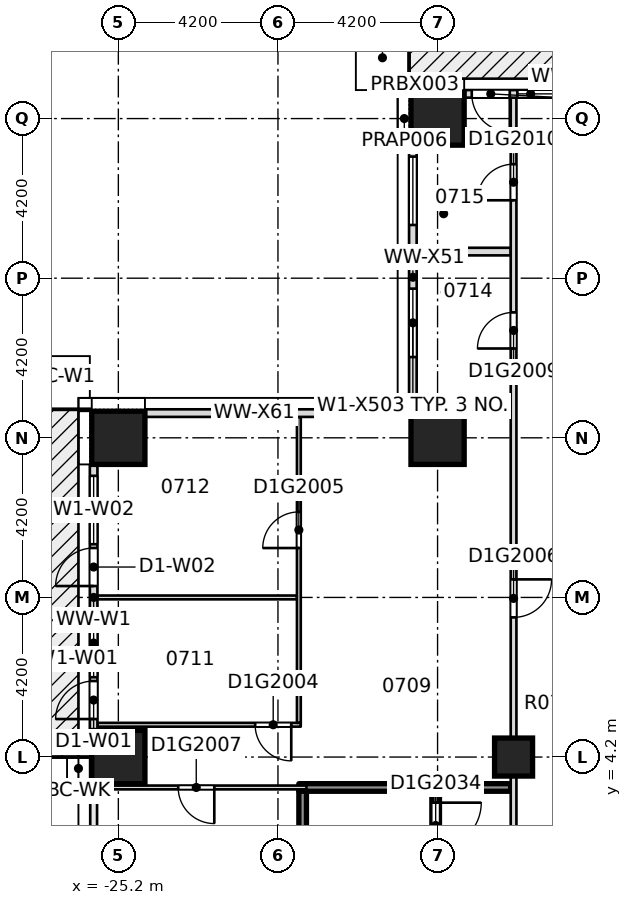
"""IFC4 building model, lengths in metres.
Left out: names, types, materials, properties, quantities, classifications, styles, units other than length and angle.
Written with IfcOpenShell. Run it as: python <this file> out.ifc"""

import sys

from ifc_helpers import new_model, si_unit, direction, frame, frame_2d, origin, origin_2d, place, context, subcontext, project, spatial, rectangle, extrude, element, fill, save


model = new_model("IFC4")
c1 = context("Model", 3, precision=1e-05, world=origin(), true_north=direction((0.0, 1.0)))
c2 = subcontext(c1, "Body", "Model", "MODEL_VIEW")
j1 = project(units=[si_unit("LENGTHUNIT", "METRE"), si_unit("PLANEANGLEUNIT", "RADIAN")], contexts=[c1])
p1 = place(None, origin())
s1 = spatial("IfcSite", under=j1, at=p1, CompositionType="ELEMENT")
p2 = place(p1, origin())
s2 = spatial("IfcBuilding", under=s1, at=p2, CompositionType="ELEMENT")
p3 = place(p2, frame((0.0, 0.0, 37.95)))
s3 = spatial("IfcBuildingStorey", under=s2, at=p3, CompositionType="ELEMENT", Elevation=37.95)
for number, where, z_axis, x_axis in (
    (1, (-25.2, 4.2, -0.32), (0.0, 0.0, 1.0), (1.0, 0.0, 0.0)),
    (2, (-25.2, 12.6, -0.32), (0.0, 0.0, 1.0), (1.0, 0.0, 0.0)),
    (3, (-16.8, 12.6, -0.32), (0.0, 0.0, 1.0), (1.0, 0.0, 0.0)),
    (4, (-16.8, 21.0, -0.32), (0.0, 0.0, 1.0), (1.0, 0.0, 0.0)),
):
    element("IfcColumn", number, at=place(p3, frame(where, z_axis=z_axis, x_axis=x_axis)), inside=s3, PredefinedType="COLUMN", context=c2, shape_type="SweptSolid", body=[
        extrude(rectangle(XDim=1.4, YDim=1.4, at=origin_2d()), origin(), (0.0, 0.0, 1.0), 3.45),
    ])
p4 = place(p3, frame((-14.8, 4.2, -0.32), z_axis=(0.0, 0.0, 1.0), x_axis=(1.0, 0.0, 0.0)))
e5 = element("IfcColumn", 5, at=p4, inside=s3, PredefinedType="COLUMN", context=c2, shape_type="SweptSolid", body=[
    extrude(rectangle(XDim=1.0, YDim=1.0, at=origin_2d()), origin(), (0.0, 0.0, 1.0), 3.45),
])
p5 = place(p3, frame((-25.75, 3.4, 0.0), z_axis=(0.0, 0.0, 1.0), x_axis=(1.0, 0.0, 0.0)))
e6 = element("IfcWall", 6, at=p5, inside=s3, PredefinedType="PARTITIONING", context=c2, shape_type="SweptSolid", body=[
    extrude(rectangle(XDim=5.5, YDim=0.1, at=frame_2d((2.75, 0.0))), origin(), (0.0, 0.0, 1.0), 3.13),
])
p6 = place(p5, frame((2.125, 0.0, 0.0)))
e7 = element("IfcOpeningElement", 7, at=p6, cuts=e6, PredefinedType="OPENING", context=c2, shape_type="SweptSolid", body=[
    extrude(rectangle(XDim=0.95, YDim=2.1, at=frame_2d((0.475, 1.05))), frame((0.0, 0.06, 0.0), z_axis=(0.0, -1.0, 0.0), x_axis=(1.0, 0.0, 0.0)), (0.0, 0.0, 1.0), 0.12),
])
p7 = place(p3, frame((-20.45, 3.4, 0.0), z_axis=(0.0, 0.0, 1.0), x_axis=(1.0, 0.0, 0.0)))
e8 = element("IfcWall", 8, at=p7, inside=s3, PredefinedType="SOLIDWALL", context=c2, shape_type="SweptSolid", body=[
    extrude(rectangle(XDim=5.575, YDim=0.2, at=frame_2d((2.788, 0.0))), origin(), (0.0, 0.0, 1.0), 3.13),
])
p8 = place(p3, frame((-25.75, 5.05, 0.0), z_axis=(0.0, 0.0, 1.0), x_axis=(1.0, 0.0, 0.0)))
e9 = element("IfcWall", 9, at=p8, inside=s3, PredefinedType="PARTITIONING", context=c2, shape_type="SweptSolid", body=[
    extrude(rectangle(XDim=5.35, YDim=0.1, at=frame_2d((2.675, 0.0))), origin(), (0.0, 0.0, 1.0), 3.13),
])
p9 = place(p8, frame((4.15, 0.0, 0.0)))
e10 = element("IfcOpeningElement", 10, at=p9, cuts=e9, PredefinedType="OPENING", context=c2, shape_type="SweptSolid", body=[
    extrude(rectangle(XDim=0.95, YDim=2.1, at=frame_2d((0.475, 1.05))), frame((0.0, 0.06, 0.0), z_axis=(0.0, -1.0, 0.0), x_axis=(1.0, 0.0, 0.0)), (0.0, 0.0, 1.0), 0.12),
])
p10 = place(p3, frame((-25.75, 8.4, 0.0), z_axis=(0.0, 0.0, 1.0), x_axis=(1.0, 0.0, 0.0)))
e11 = element("IfcWall", 11, at=p10, inside=s3, PredefinedType="PARTITIONING", context=c2, shape_type="SweptSolid", body=[
    extrude(rectangle(XDim=5.25, YDim=0.1, at=frame_2d((2.625, 0.0))), origin(), (0.0, 0.0, 1.0), 3.13),
])
for number, where, z_axis, x_axis in (
    (12, (-17.35, 13.35, 0.0), (0.0, 0.0, 1.0), (1.0, 0.0, 0.0)),
    (13, (-17.35, 17.5, 0.0), (0.0, 0.0, 1.0), (1.0, 0.0, 0.0)),
):
    element("IfcWall", number, at=place(p3, frame(where, z_axis=z_axis, x_axis=x_axis)), inside=s3, PredefinedType="PARTITIONING", context=c2, shape_type="SweptSolid", body=[
        extrude(rectangle(XDim=2.475, YDim=0.2, at=frame_2d((1.238, 0.0))), origin(), (0.0, 0.0, 1.0), 3.13),
    ])
p11 = place(p3, frame((-20.45, 5.1, 0.0), z_axis=(0.0, 0.0, 1.0), x_axis=(0.0, 1.0, 0.0)))
e14 = element("IfcWall", 14, at=p11, inside=s3, PredefinedType="PARTITIONING", context=c2, shape_type="SweptSolid", body=[
    extrude(rectangle(XDim=8.05, YDim=0.1, at=frame_2d((4.025, 0.0))), origin(), (0.0, 0.0, 1.0), 3.13),
])
p12 = place(p11, frame((4.6, 0.0, 0.0)))
e15 = element("IfcOpeningElement", 15, at=p12, cuts=e14, PredefinedType="OPENING", context=c2, shape_type="SweptSolid", body=[
    extrude(rectangle(XDim=0.95, YDim=2.1, at=frame_2d((0.475, 1.05))), frame((0.0, 0.06, 0.0), z_axis=(0.0, -1.0, 0.0), x_axis=(1.0, 0.0, 0.0)), (0.0, 0.0, 1.0), 0.12),
])
p13 = place(p3, frame((-16.85, -3.3, 0.0), z_axis=(0.0, 0.0, 1.0), x_axis=(0.0, 1.0, 0.0)))
e16 = element("IfcWall", 16, at=p13, inside=s3, PredefinedType="SOLIDWALL", context=c2, shape_type="SweptSolid", body=[
    extrude(rectangle(XDim=6.6, YDim=0.2, at=frame_2d((3.3, 0.0))), origin(), (0.0, 0.0, 1.0), 3.13),
])
p14 = place(p13, frame((5.1, 0.0, 0.0)))
e17 = element("IfcOpeningElement", 17, at=p14, cuts=e16, PredefinedType="OPENING", context=c2, shape_type="SweptSolid", body=[
    extrude(rectangle(XDim=1.2, YDim=2.1, at=frame_2d((0.6, 1.05))), frame((0.0, 0.11, 0.0), z_axis=(0.0, -1.0, 0.0), x_axis=(1.0, 0.0, 0.0)), (0.0, 0.0, 1.0), 0.22),
])
p15 = place(p3, frame((-14.8, -6.225, 0.0), z_axis=(0.0, 0.0, 1.0), x_axis=(0.0, 1.0, 0.0)))
e18 = element("IfcWall", 18, at=p15, inside=s3, PredefinedType="PARTITIONING", context=c2, shape_type="SweptSolid", body=[
    extrude(rectangle(XDim=27.775, YDim=0.15, at=frame_2d((13.888, 0.0))), origin(), (0.0, 0.0, 1.0), 3.13),
])
p16 = place(p15, frame((14.1, 0.0, 0.0)))
e19 = element("IfcOpeningElement", 19, at=p16, cuts=e18, PredefinedType="OPENING", context=c2, shape_type="SweptSolid", body=[
    extrude(rectangle(XDim=1.0, YDim=2.1, at=frame_2d((0.5, 1.05))), frame((0.0, 0.085, 0.0), z_axis=(0.0, -1.0, 0.0), x_axis=(1.0, 0.0, 0.0)), (0.0, 0.0, 1.0), 0.17),
])
p17 = place(p15, frame((21.175, 0.0, 0.0)))
e20 = element("IfcOpeningElement", 20, at=p17, cuts=e18, PredefinedType="OPENING", context=c2, shape_type="SweptSolid", body=[
    extrude(rectangle(XDim=0.95, YDim=2.1, at=frame_2d((0.475, 1.05))), frame((0.0, 0.085, 0.0), z_axis=(0.0, -1.0, 0.0), x_axis=(1.0, 0.0, 0.0)), (0.0, 0.0, 1.0), 0.17),
])
p18 = place(p15, frame((25.075, 0.0, 0.0)))
e21 = element("IfcOpeningElement", 21, at=p18, cuts=e18, PredefinedType="OPENING", context=c2, shape_type="SweptSolid", body=[
    extrude(rectangle(XDim=0.95, YDim=2.1, at=frame_2d((0.475, 1.05))), frame((0.0, 0.085, 0.0), z_axis=(0.0, -1.0, 0.0), x_axis=(1.0, 0.0, 0.0)), (0.0, 0.0, 1.0), 0.17),
])
p19 = place(p15, frame((5.675, 0.0, 0.0)))
e22 = element("IfcOpeningElement", 22, at=p19, cuts=e18, PredefinedType="OPENING", context=c2, shape_type="SweptSolid", body=[
    extrude(rectangle(XDim=1.1, YDim=2.1, at=frame_2d((0.55, 1.05))), frame((0.0, 0.085, 0.0), z_axis=(0.0, -1.0, 0.0), x_axis=(1.0, 0.0, 0.0)), (0.0, 0.0, 1.0), 0.17),
])
p20 = place(p3, frame((-12.6, 21.65, 0.0), z_axis=(0.0, 0.0, 1.0), x_axis=(-1.0, 0.0, 0.0)))
e23 = element("IfcWall", 23, at=p20, inside=s3, PredefinedType="STANDARD", context=c2, shape_type="SweptSolid", body=[
    extrude(rectangle(XDim=3.5, YDim=0.2, at=frame_2d((1.75, 0.0))), origin(), (0.0, 0.0, 1.0), 3.13),
])
p21 = place(p20, frame((0.3, 0.0, 0.2)))
e24 = element("IfcOpeningElement", 24, at=p21, cuts=e23, PredefinedType="OPENING", context=c2, shape_type="SweptSolid", body=[
    extrude(rectangle(XDim=1.8, YDim=2.65, at=frame_2d((0.9, 1.325))), frame((0.0, 0.11, 0.0), z_axis=(0.0, -1.0, 0.0), x_axis=(1.0, 0.0, 0.0)), (0.0, 0.0, 1.0), 0.22),
])
p22 = place(p20, frame((2.3, 0.0, 0.0)))
e25 = element("IfcOpeningElement", 25, at=p22, cuts=e23, PredefinedType="OPENING", context=c2, shape_type="SweptSolid", body=[
    extrude(rectangle(XDim=1.0, YDim=2.4, at=frame_2d((0.5, 1.2))), frame((0.0, 0.11, 0.0), z_axis=(0.0, -1.0, 0.0), x_axis=(1.0, 0.0, 0.0)), (0.0, 0.0, 1.0), 0.22),
])
p23 = place(p3, frame((-17.45, 20.3, 0.0), z_axis=(0.0, 0.0, 1.0), x_axis=(0.0, -1.0, 0.0)))
e26 = element("IfcWall", 26, at=p23, inside=s3, PredefinedType="STANDARD", context=c2, shape_type="SweptSolid", body=[
    extrude(rectangle(XDim=6.95, YDim=0.2, at=frame_2d((3.475, 0.0))), origin(), (0.0, 0.0, 1.0), 3.13),
])
p24 = place(p23, frame((3.775, 0.0, 0.2)))
e27 = element("IfcOpeningElement", 27, at=p24, cuts=e26, PredefinedType="OPENING", context=c2, shape_type="SweptSolid", body=[
    extrude(rectangle(XDim=1.8, YDim=2.65, at=frame_2d((0.9, 1.325))), frame((0.0, 0.11, 0.0), z_axis=(0.0, -1.0, 0.0), x_axis=(1.0, 0.0, 0.0)), (0.0, 0.0, 1.0), 0.22),
])
p25 = place(p23, frame((0.3, 0.0, 0.2)))
e28 = element("IfcOpeningElement", 28, at=p25, cuts=e26, PredefinedType="OPENING", context=c2, shape_type="SweptSolid", body=[
    extrude(rectangle(XDim=1.8, YDim=2.65, at=frame_2d((0.9, 1.325))), frame((0.0, 0.11, 0.0), z_axis=(0.0, -1.0, 0.0), x_axis=(1.0, 0.0, 0.0)), (0.0, 0.0, 1.0), 0.22),
])
p26 = place(p3, frame((-17.55, 13.25, 0.0), z_axis=(0.0, 0.0, 1.0), x_axis=(-1.0, 0.0, 0.0)))
e29 = element("IfcWall", 29, at=p26, inside=s3, PredefinedType="STANDARD", context=c2, shape_type="SweptSolid", body=[
    extrude(rectangle(XDim=6.95, YDim=0.2, at=frame_2d((3.475, 0.0))), origin(), (0.0, 0.0, 1.0), 3.13),
])
p27 = place(p3, frame((-25.85, 11.9, 0.0), z_axis=(0.0, 0.0, 1.0), x_axis=(0.0, -1.0, 0.0)))
e30 = element("IfcWall", 30, at=p27, inside=s3, PredefinedType="STANDARD", context=c2, shape_type="SweptSolid", body=[
    extrude(rectangle(XDim=7.0, YDim=0.2, at=frame_2d((3.5, 0.0))), origin(), (0.0, 0.0, 1.0), 3.13),
])
p28 = place(p27, frame((3.8, 0.0, 0.2)))
e31 = element("IfcOpeningElement", 31, at=p28, cuts=e30, PredefinedType="OPENING", context=c2, shape_type="SweptSolid", body=[
    extrude(rectangle(XDim=1.8, YDim=2.65, at=frame_2d((0.9, 1.325))), frame((0.0, 0.11, 0.0), z_axis=(0.0, -1.0, 0.0), x_axis=(1.0, 0.0, 0.0)), (0.0, 0.0, 1.0), 0.22),
])
p29 = place(p27, frame((5.7, 0.0, 0.0)))
e32 = element("IfcOpeningElement", 32, at=p29, cuts=e30, PredefinedType="OPENING", context=c2, shape_type="SweptSolid", body=[
    extrude(rectangle(XDim=1.0, YDim=2.4, at=frame_2d((0.5, 1.2))), frame((0.0, 0.11, 0.0), z_axis=(0.0, -1.0, 0.0), x_axis=(1.0, 0.0, 0.0)), (0.0, 0.0, 1.0), 0.22),
])
p30 = place(p27, frame((0.3, 0.0, 0.2)))
e33 = element("IfcOpeningElement", 33, at=p30, cuts=e30, PredefinedType="OPENING", context=c2, shape_type="SweptSolid", body=[
    extrude(rectangle(XDim=1.8, YDim=2.65, at=frame_2d((0.9, 1.325))), frame((0.0, 0.11, 0.0), z_axis=(0.0, -1.0, 0.0), x_axis=(1.0, 0.0, 0.0)), (0.0, 0.0, 1.0), 0.22),
])
p31 = place(p27, frame((2.2, 0.0, 0.0)))
e34 = element("IfcOpeningElement", 34, at=p31, cuts=e30, PredefinedType="OPENING", context=c2, shape_type="SweptSolid", body=[
    extrude(rectangle(XDim=1.0, YDim=2.4, at=frame_2d((0.5, 1.2))), frame((0.0, 0.11, 0.0), z_axis=(0.0, -1.0, 0.0), x_axis=(1.0, 0.0, 0.0)), (0.0, 0.0, 1.0), 0.22),
])
p32 = place(p3, frame((-20.35, -3.3, 0.0), z_axis=(0.0, 0.0, 1.0), x_axis=(0.0, 1.0, 0.0)))
e35 = element("IfcWall", 35, at=p32, inside=s3, PredefinedType="SOLIDWALL", context=c2, shape_type="SweptSolid", body=[
    extrude(rectangle(XDim=6.6, YDim=0.2, at=frame_2d((3.3, 0.0))), origin(), (0.0, 0.0, 1.0), 3.13),
])
p33 = place(p9, origin())
e36 = element("IfcDoor", 36, at=p33, inside=s3, OperationType="SINGLE_SWING_LEFT", PredefinedType="DOOR", context=c2, shape_type="SweptSolid", body=[
    extrude(rectangle(XDim=0.95, YDim=2.1, at=frame_2d((0.475, 1.05))), frame((0.0, 0.025, 0.0), z_axis=(0.0, -1.0, 0.0), x_axis=(1.0, 0.0, 0.0)), (0.0, 0.0, 1.0), 0.05),
])
fill(e10, e36)
p34 = place(p12, origin())
e37 = element("IfcDoor", 37, at=p34, inside=s3, OperationType="SINGLE_SWING_RIGHT", PredefinedType="DOOR", context=c2, shape_type="SweptSolid", body=[
    extrude(rectangle(XDim=0.95, YDim=2.1, at=frame_2d((0.475, 1.05))), frame((0.0, 0.025, 0.0), z_axis=(0.0, -1.0, 0.0), x_axis=(1.0, 0.0, 0.0)), (0.0, 0.0, 1.0), 0.05),
])
fill(e15, e37)
p35 = place(p16, origin())
e38 = element("IfcDoor", 38, at=p35, inside=s3, OperationType="SINGLE_SWING_LEFT", PredefinedType="DOOR", context=c2, shape_type="SweptSolid", body=[
    extrude(rectangle(XDim=1.0, YDim=2.1, at=frame_2d((0.5, 1.05))), frame((0.0, 0.025, 0.0), z_axis=(0.0, -1.0, 0.0), x_axis=(1.0, 0.0, 0.0)), (0.0, 0.0, 1.0), 0.05),
])
fill(e19, e38)
p36 = place(p6, origin())
e39 = element("IfcDoor", 39, at=p36, inside=s3, OperationType="SINGLE_SWING_LEFT", PredefinedType="DOOR", context=c2, shape_type="SweptSolid", body=[
    extrude(rectangle(XDim=0.95, YDim=2.1, at=frame_2d((0.475, 1.05))), frame((0.0, 0.025, 0.0), z_axis=(0.0, -1.0, 0.0), x_axis=(1.0, 0.0, 0.0)), (0.0, 0.0, 1.0), 0.05),
])
fill(e7, e39)
p37 = place(p17, origin())
e40 = element("IfcDoor", 40, at=p37, inside=s3, OperationType="SINGLE_SWING_RIGHT", PredefinedType="DOOR", context=c2, shape_type="SweptSolid", body=[
    extrude(rectangle(XDim=0.95, YDim=2.1, at=frame_2d((0.475, 1.05))), frame((0.0, 0.025, 0.0), z_axis=(0.0, -1.0, 0.0), x_axis=(1.0, 0.0, 0.0)), (0.0, 0.0, 1.0), 0.05),
])
fill(e20, e40)
p38 = place(p18, origin())
e41 = element("IfcDoor", 41, at=p38, inside=s3, OperationType="SINGLE_SWING_LEFT", PredefinedType="DOOR", context=c2, shape_type="SweptSolid", body=[
    extrude(rectangle(XDim=0.95, YDim=2.1, at=frame_2d((0.475, 1.05))), frame((0.0, 0.025, 0.0), z_axis=(0.0, -1.0, 0.0), x_axis=(1.0, 0.0, 0.0)), (0.0, 0.0, 1.0), 0.05),
])
fill(e21, e41)
p39 = place(p14, origin())
e42 = element("IfcDoor", 42, at=p39, inside=s3, OperationType="SINGLE_SWING_RIGHT", PredefinedType="DOOR", context=c2, shape_type="SweptSolid", body=[
    extrude(rectangle(XDim=1.2, YDim=2.1, at=frame_2d((0.6, 1.05))), frame((0.0, 0.025, 0.0), z_axis=(0.0, -1.0, 0.0), x_axis=(1.0, 0.0, 0.0)), (0.0, 0.0, 1.0), 0.05),
])
fill(e17, e42)
p40 = place(p21, origin())
e43 = element("IfcWindow", 43, at=p40, inside=s3, PartitioningType="SINGLE_PANEL", PredefinedType="WINDOW", context=c2, shape_type="SweptSolid", body=[
    extrude(rectangle(XDim=1.8, YDim=2.65, at=frame_2d((0.9, 1.325))), frame((0.0, 0.03, 0.0), z_axis=(0.0, -1.0, 0.0), x_axis=(1.0, 0.0, 0.0)), (0.0, 0.0, 1.0), 0.06),
])
fill(e24, e43)
p41 = place(p22, origin())
e44 = element("IfcDoor", 44, at=p41, inside=s3, OperationType="SINGLE_SWING_LEFT", PredefinedType="DOOR", context=c2, shape_type="SweptSolid", body=[
    extrude(rectangle(XDim=1.0, YDim=2.4, at=frame_2d((0.5, 1.2))), frame((0.0, 0.025, 0.0), z_axis=(0.0, -1.0, 0.0), x_axis=(1.0, 0.0, 0.0)), (0.0, 0.0, 1.0), 0.05),
])
fill(e25, e44)
p42 = place(p24, origin())
e45 = element("IfcWindow", 45, at=p42, inside=s3, PartitioningType="SINGLE_PANEL", PredefinedType="WINDOW", context=c2, shape_type="SweptSolid", body=[
    extrude(rectangle(XDim=1.8, YDim=2.65, at=frame_2d((0.9, 1.325))), frame((0.0, 0.03, 0.0), z_axis=(0.0, -1.0, 0.0), x_axis=(1.0, 0.0, 0.0)), (0.0, 0.0, 1.0), 0.06),
])
fill(e27, e45)
p43 = place(p25, origin())
e46 = element("IfcWindow", 46, at=p43, inside=s3, PartitioningType="SINGLE_PANEL", PredefinedType="WINDOW", context=c2, shape_type="SweptSolid", body=[
    extrude(rectangle(XDim=1.8, YDim=2.65, at=frame_2d((0.9, 1.325))), frame((0.0, 0.03, 0.0), z_axis=(0.0, -1.0, 0.0), x_axis=(1.0, 0.0, 0.0)), (0.0, 0.0, 1.0), 0.06),
])
fill(e28, e46)
p44 = place(p28, origin())
e47 = element("IfcWindow", 47, at=p44, inside=s3, PartitioningType="SINGLE_PANEL", PredefinedType="WINDOW", context=c2, shape_type="SweptSolid", body=[
    extrude(rectangle(XDim=1.8, YDim=2.65, at=frame_2d((0.9, 1.325))), frame((0.0, 0.03, 0.0), z_axis=(0.0, -1.0, 0.0), x_axis=(1.0, 0.0, 0.0)), (0.0, 0.0, 1.0), 0.06),
])
fill(e31, e47)
p45 = place(p29, origin())
e48 = element("IfcDoor", 48, at=p45, inside=s3, OperationType="SINGLE_SWING_LEFT", PredefinedType="DOOR", context=c2, shape_type="SweptSolid", body=[
    extrude(rectangle(XDim=1.0, YDim=2.4, at=frame_2d((0.5, 1.2))), frame((0.0, 0.025, 0.0), z_axis=(0.0, -1.0, 0.0), x_axis=(1.0, 0.0, 0.0)), (0.0, 0.0, 1.0), 0.05),
])
fill(e32, e48)
p46 = place(p30, origin())
e49 = element("IfcWindow", 49, at=p46, inside=s3, PartitioningType="SINGLE_PANEL", PredefinedType="WINDOW", context=c2, shape_type="SweptSolid", body=[
    extrude(rectangle(XDim=1.8, YDim=2.65, at=frame_2d((0.9, 1.325))), frame((0.0, 0.03, 0.0), z_axis=(0.0, -1.0, 0.0), x_axis=(1.0, 0.0, 0.0)), (0.0, 0.0, 1.0), 0.06),
])
fill(e33, e49)
p47 = place(p31, origin())
e50 = element("IfcDoor", 50, at=p47, inside=s3, OperationType="SINGLE_SWING_LEFT", PredefinedType="DOOR", context=c2, shape_type="SweptSolid", body=[
    extrude(rectangle(XDim=1.0, YDim=2.4, at=frame_2d((0.5, 1.2))), frame((0.0, 0.025, 0.0), z_axis=(0.0, -1.0, 0.0), x_axis=(1.0, 0.0, 0.0)), (0.0, 0.0, 1.0), 0.05),
])
fill(e34, e50)
save(model, sys.argv[1])
